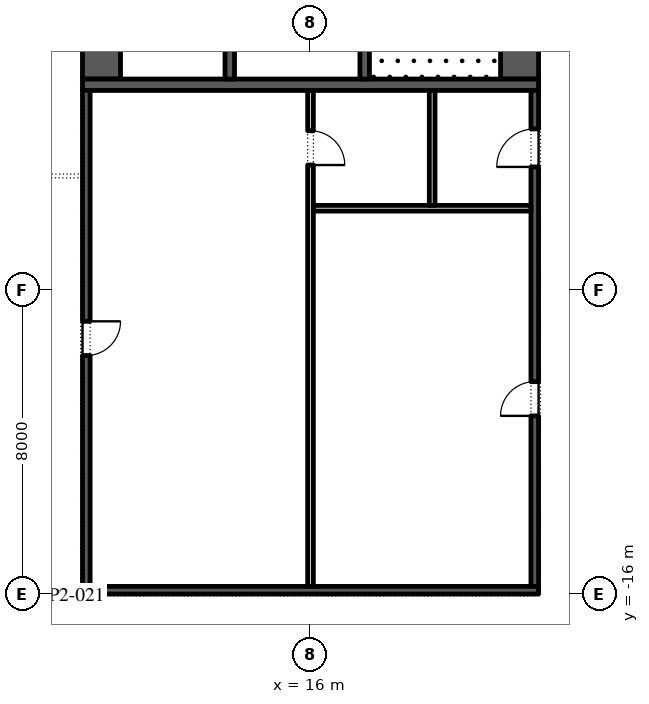
"""IFC4 building model, lengths in metres.
Left out: names, types, materials, properties, quantities, classifications, styles, units other than length and angle.
Written with IfcOpenShell. Run it as: python <this file> out.ifc"""

import sys

from ifc_helpers import new_model, si_unit, direction, frame, frame_2d, origin, place, context, subcontext, project, spatial, rectangle, extrude, element, fill, save


model = new_model("IFC4")
c1 = context("Model", 3, precision=1e-05, world=origin(), true_north=direction((0.0, 1.0)))
c2 = subcontext(c1, "Body", "Model", "MODEL_VIEW")
j1 = project(units=[si_unit("LENGTHUNIT", "METRE"), si_unit("PLANEANGLEUNIT", "RADIAN")], contexts=[c1])
p1 = place(None, origin())
s1 = spatial("IfcSite", under=j1, at=p1, CompositionType="ELEMENT")
p2 = place(p1, origin())
s2 = spatial("IfcBuilding", under=s1, at=p2, CompositionType="ELEMENT")
p3 = place(p2, frame((0.0, 0.0, 77.4)))
s3 = spatial("IfcBuildingStorey", under=s2, at=p3, CompositionType="ELEMENT", Elevation=77.4)
p4 = place(p3, frame((21.5, -2.45, 0.0), z_axis=(0.0, 0.0, 1.0), x_axis=(0.0, 1.0, 0.0)))
e1 = element("IfcWall", 1, at=p4, inside=s3, PredefinedType="SHEAR", context=c2, shape_type="SweptSolid", body=[
    extrude(rectangle(XDim=27.9, YDim=1.0, at=frame_2d((13.95, 0.0))), origin(), (0.0, 0.0, 1.0), 4.0),
])
p5 = place(p4, frame((5.05, 0.0, 0.0)))
e2 = element("IfcOpeningElement", 2, at=p5, cuts=e1, PredefinedType="OPENING", context=c2, shape_type="SweptSolid", body=[
    extrude(rectangle(XDim=1.2, YDim=2.1, at=frame_2d((0.6, 1.05))), frame((0.0, 0.51, 0.0), z_axis=(0.0, -1.0, 0.0), x_axis=(1.0, 0.0, 0.0)), (0.0, 0.0, 1.0), 1.02),
])
p6 = place(p4, frame((21.65, 0.0, 0.0)))
e3 = element("IfcOpeningElement", 3, at=p6, cuts=e1, PredefinedType="OPENING", context=c2, shape_type="SweptSolid", body=[
    extrude(rectangle(XDim=1.2, YDim=2.1, at=frame_2d((0.6, 1.05))), frame((0.0, 0.51, 0.0), z_axis=(0.0, -1.0, 0.0), x_axis=(1.0, 0.0, 0.0)), (0.0, 0.0, 1.0), 1.02),
])
p7 = place(p3, frame((10.5, -2.45, 0.0), z_axis=(0.0, 0.0, 1.0), x_axis=(0.0, 1.0, 0.0)))
e4 = element("IfcWall", 4, at=p7, inside=s3, PredefinedType="SHEAR", context=c2, shape_type="SweptSolid", body=[
    extrude(rectangle(XDim=27.9, YDim=1.0, at=frame_2d((13.95, 0.0))), origin(), (0.0, 0.0, 1.0), 4.0),
])
p8 = place(p7, frame((23.65, 0.0, 0.0)))
e5 = element("IfcOpeningElement", 5, at=p8, cuts=e4, PredefinedType="OPENING", context=c2, shape_type="SweptSolid", body=[
    extrude(rectangle(XDim=2.4, YDim=2.1, at=frame_2d((1.2, 1.05))), frame((0.0, 0.51, 0.0), z_axis=(0.0, -1.0, 0.0), x_axis=(1.0, 0.0, 0.0)), (0.0, 0.0, 1.0), 1.02),
])
p9 = place(p7, frame((0.788, 0.0, 0.0)))
e6 = element("IfcOpeningElement", 6, at=p9, cuts=e4, PredefinedType="OPENING", context=c2, shape_type="SweptSolid", body=[
    extrude(rectangle(XDim=0.9, YDim=2.1, at=frame_2d((0.45, 1.05))), frame((0.0, 0.51, 0.0), z_axis=(0.0, -1.0, 0.0), x_axis=(1.0, 0.0, 0.0)), (0.0, 0.0, 1.0), 1.02),
])
p10 = place(p7, frame((4.012, 0.0, 0.0)))
e7 = element("IfcOpeningElement", 7, at=p10, cuts=e4, PredefinedType="OPENING", context=c2, shape_type="SweptSolid", body=[
    extrude(rectangle(XDim=0.9, YDim=2.1, at=frame_2d((0.45, 1.05))), frame((0.0, 0.51, 0.0), z_axis=(0.0, -1.0, 0.0), x_axis=(1.0, 0.0, 0.0)), (0.0, 0.0, 1.0), 1.02),
])
p11 = place(p3, frame((10.0, -2.6, 0.0), z_axis=(0.0, 0.0, 1.0), x_axis=(1.0, 0.0, 0.0)))
e8 = element("IfcWall", 8, at=p11, inside=s3, PredefinedType="SHEAR", context=c2, shape_type="SweptSolid", body=[
    extrude(rectangle(XDim=12.0, YDim=0.3, at=frame_2d((6.0, 0.0))), origin(), (0.0, 0.0, 1.0), 4.0),
])
p12 = place(p3, frame((17.425, -2.45, 0.0), z_axis=(0.0, 0.0, 1.0), x_axis=(0.0, 1.0, 0.0)))
e9 = element("IfcWall", 9, at=p12, inside=s3, PredefinedType="SHEAR", context=c2, shape_type="SweptSolid", body=[
    extrude(rectangle(XDim=6.3, YDim=0.25, at=frame_2d((3.15, 0.0))), origin(), (0.0, 0.0, 1.0), 4.0),
])
p13 = place(p12, frame((5.05, 0.0, 0.0)))
e10 = element("IfcOpeningElement", 10, at=p13, cuts=e9, PredefinedType="OPENING", context=c2, shape_type="SweptSolid", body=[
    extrude(rectangle(XDim=1.2, YDim=2.1, at=frame_2d((0.6, 1.05))), frame((0.0, 0.135, 0.0), z_axis=(0.0, -1.0, 0.0), x_axis=(1.0, 0.0, 0.0)), (0.0, 0.0, 1.0), 0.27),
])
p14 = place(p3, frame((13.875, -2.45, 0.0), z_axis=(0.0, 0.0, 1.0), x_axis=(0.0, 1.0, 0.0)))
e11 = element("IfcWall", 11, at=p14, inside=s3, PredefinedType="SHEAR", context=c2, shape_type="SweptSolid", body=[
    extrude(rectangle(XDim=21.3, YDim=0.25, at=frame_2d((10.65, 0.0))), origin(), (0.0, 0.0, 1.0), 4.0),
])
p15 = place(p14, frame((10.396, 0.0, 0.0)))
e12 = element("IfcOpeningElement", 12, at=p15, cuts=e11, PredefinedType="OPENING", context=c2, shape_type="SweptSolid", body=[
    extrude(rectangle(XDim=0.9, YDim=2.1, at=frame_2d((0.45, 1.05))), frame((0.0, 0.135, 0.0), z_axis=(0.0, -1.0, 0.0), x_axis=(1.0, 0.0, 0.0)), (0.0, 0.0, 1.0), 0.27),
])
p16 = place(p14, frame((14.6, 0.0, 0.0)))
e13 = element("IfcOpeningElement", 13, at=p16, cuts=e11, PredefinedType="OPENING", context=c2, shape_type="SweptSolid", body=[
    extrude(rectangle(XDim=0.9, YDim=2.1, at=frame_2d((0.45, 1.05))), frame((0.0, 0.135, 0.0), z_axis=(0.0, -1.0, 0.0), x_axis=(1.0, 0.0, 0.0)), (0.0, 0.0, 1.0), 0.27),
])
p17 = place(p14, frame((18.775, 0.0, 0.0)))
e14 = element("IfcOpeningElement", 14, at=p17, cuts=e11, PredefinedType="OPENING", context=c2, shape_type="SweptSolid", body=[
    extrude(rectangle(XDim=0.9, YDim=2.1, at=frame_2d((0.45, 1.05))), frame((0.0, 0.135, 0.0), z_axis=(0.0, -1.0, 0.0), x_axis=(1.0, 0.0, 0.0)), (0.0, 0.0, 1.0), 0.27),
])
p18 = place(p14, frame((6.971, 0.0, 0.0)))
e15 = element("IfcOpeningElement", 15, at=p18, cuts=e11, PredefinedType="OPENING", context=c2, shape_type="SweptSolid", body=[
    extrude(rectangle(XDim=1.1, YDim=2.1, at=frame_2d((0.55, 1.05))), frame((0.0, 0.135, 0.0), z_axis=(0.0, -1.0, 0.0), x_axis=(1.0, 0.0, 0.0)), (0.0, 0.0, 1.0), 0.27),
])
p19 = place(p3, frame((21.9, -15.8, 0.0), z_axis=(0.0, 0.0, 1.0), x_axis=(0.0, 1.0, 0.0)))
e16 = element("IfcWall", 16, at=p19, inside=s3, PredefinedType="SHEAR", context=c2, shape_type="SweptSolid", body=[
    extrude(rectangle(XDim=13.05, YDim=0.2, at=frame_2d((6.525, 0.0))), origin(), (0.0, 0.0, 1.0), 4.0),
])
p20 = place(p19, frame((4.488, 0.0, 0.0)))
e17 = element("IfcOpeningElement", 17, at=p20, cuts=e16, PredefinedType="OPENING", context=c2, shape_type="SweptSolid", body=[
    extrude(rectangle(XDim=0.9, YDim=2.1, at=frame_2d((0.45, 1.05))), frame((0.0, 0.11, 0.0), z_axis=(0.0, -1.0, 0.0), x_axis=(1.0, 0.0, 0.0)), (0.0, 0.0, 1.0), 0.22),
])
p21 = place(p19, frame((11.038, 0.0, 0.0)))
e18 = element("IfcOpeningElement", 18, at=p21, cuts=e16, PredefinedType="OPENING", context=c2, shape_type="SweptSolid", body=[
    extrude(rectangle(XDim=1.0, YDim=2.1, at=frame_2d((0.5, 1.05))), frame((0.0, 0.11, 0.0), z_axis=(0.0, -1.0, 0.0), x_axis=(1.0, 0.0, 0.0)), (0.0, 0.0, 1.0), 0.22),
])
p22 = place(p3, frame((10.1, -15.8, 0.0), z_axis=(0.0, 0.0, 1.0), x_axis=(0.0, 1.0, 0.0)))
e19 = element("IfcWall", 19, at=p22, inside=s3, PredefinedType="SHEAR", context=c2, shape_type="SweptSolid", body=[
    extrude(rectangle(XDim=13.05, YDim=0.2, at=frame_2d((6.525, 0.0))), origin(), (0.0, 0.0, 1.0), 4.0),
])
p23 = place(p22, frame((6.075, 0.0, 0.0)))
e20 = element("IfcOpeningElement", 20, at=p23, cuts=e19, PredefinedType="OPENING", context=c2, shape_type="SweptSolid", body=[
    extrude(rectangle(XDim=0.9, YDim=2.1, at=frame_2d((0.45, 1.05))), frame((0.0, 0.11, 0.0), z_axis=(0.0, -1.0, 0.0), x_axis=(1.0, 0.0, 0.0)), (0.0, 0.0, 1.0), 0.22),
])
p24 = place(p3, frame((10.0, -15.9, 0.0), z_axis=(0.0, 0.0, 1.0), x_axis=(1.0, 0.0, 0.0)))
e21 = element("IfcWall", 21, at=p24, inside=s3, PredefinedType="SHEAR", context=c2, shape_type="SweptSolid", body=[
    extrude(rectangle(XDim=12.0, YDim=0.2, at=frame_2d((6.0, 0.0))), origin(), (0.0, 0.0, 1.0), 4.0),
])
p25 = place(p3, frame((16.0, -15.8, 0.0), z_axis=(0.0, 0.0, 1.0), x_axis=(0.0, 1.0, 0.0)))
e22 = element("IfcWall", 22, at=p25, inside=s3, PredefinedType="PARTITIONING", context=c2, shape_type="SweptSolid", body=[
    extrude(rectangle(XDim=13.05, YDim=0.15, at=frame_2d((6.525, 0.0))), origin(), (0.0, 0.0, 1.0), 4.0),
])
p26 = place(p25, frame((11.087, 0.0, 0.0)))
e23 = element("IfcOpeningElement", 23, at=p26, cuts=e22, PredefinedType="OPENING", context=c2, shape_type="SweptSolid", body=[
    extrude(rectangle(XDim=0.9, YDim=2.1, at=frame_2d((0.45, 1.05))), frame((0.0, 0.085, 0.0), z_axis=(0.0, -1.0, 0.0), x_axis=(1.0, 0.0, 0.0)), (0.0, 0.0, 1.0), 0.17),
])
p27 = place(p3, frame((16.075, -5.85, 0.0), z_axis=(0.0, 0.0, 1.0), x_axis=(1.0, 0.0, 0.0)))
e24 = element("IfcWall", 24, at=p27, inside=s3, PredefinedType="PARTITIONING", context=c2, shape_type="SweptSolid", body=[
    extrude(rectangle(XDim=5.725, YDim=0.15, at=frame_2d((2.863, 0.0))), origin(), (0.0, 0.0, 1.0), 4.0),
])
p28 = place(p3, frame((19.2, -5.775, 0.0), z_axis=(0.0, 0.0, 1.0), x_axis=(0.0, 1.0, 0.0)))
e25 = element("IfcWall", 25, at=p28, inside=s3, PredefinedType="PARTITIONING", context=c2, shape_type="SweptSolid", body=[
    extrude(rectangle(XDim=3.025, YDim=0.15, at=frame_2d((1.512, 0.0))), origin(), (0.0, 0.0, 1.0), 4.0),
])
p29 = place(p20, origin())
e26 = element("IfcDoor", 26, at=p29, inside=s3, OperationType="SINGLE_SWING_RIGHT", PredefinedType="DOOR", context=c2, shape_type="SweptSolid", body=[
    extrude(rectangle(XDim=0.9, YDim=2.1, at=frame_2d((0.45, 1.05))), frame((0.0, 0.1, 0.0), z_axis=(0.0, -1.0, 0.0), x_axis=(1.0, 0.0, 0.0)), (0.0, 0.0, 1.0), 0.05),
])
fill(e17, e26)
p30 = place(p21, origin())
e27 = element("IfcDoor", 27, at=p30, inside=s3, OperationType="SINGLE_SWING_RIGHT", PredefinedType="DOOR", context=c2, shape_type="SweptSolid", body=[
    extrude(rectangle(XDim=1.0, YDim=2.1, at=frame_2d((0.5, 1.05))), frame((0.0, 0.1, 0.0), z_axis=(0.0, -1.0, 0.0), x_axis=(1.0, 0.0, 0.0)), (0.0, 0.0, 1.0), 0.05),
])
fill(e18, e27)
p31 = place(p26, frame((0.9, 0.0, 0.0), z_axis=(0.0, 0.0, 1.0), x_axis=(-1.0, 0.0, 0.0)))
e28 = element("IfcDoor", 28, at=p31, inside=s3, OperationType="SINGLE_SWING_LEFT", PredefinedType="DOOR", context=c2, shape_type="SweptSolid", body=[
    extrude(rectangle(XDim=0.9, YDim=2.1, at=frame_2d((0.45, 1.05))), frame((0.0, 0.025, 0.0), z_axis=(0.0, -1.0, 0.0), x_axis=(1.0, 0.0, 0.0)), (0.0, 0.0, 1.0), 0.05),
])
fill(e23, e28)
p32 = place(p23, frame((0.9, -0.15, 0.0), z_axis=(0.0, 0.0, 1.0), x_axis=(-1.0, 0.0, 0.0)))
e29 = element("IfcDoor", 29, at=p32, inside=s3, OperationType="SINGLE_SWING_RIGHT", PredefinedType="DOOR", context=c2, shape_type="SweptSolid", body=[
    extrude(rectangle(XDim=0.9, YDim=2.1, at=frame_2d((0.45, 1.05))), frame((0.0, -0.05, 0.0), z_axis=(0.0, -1.0, 0.0), x_axis=(1.0, 0.0, 0.0)), (0.0, 0.0, 1.0), 0.05),
])
fill(e20, e29)
save(model, sys.argv[1])
